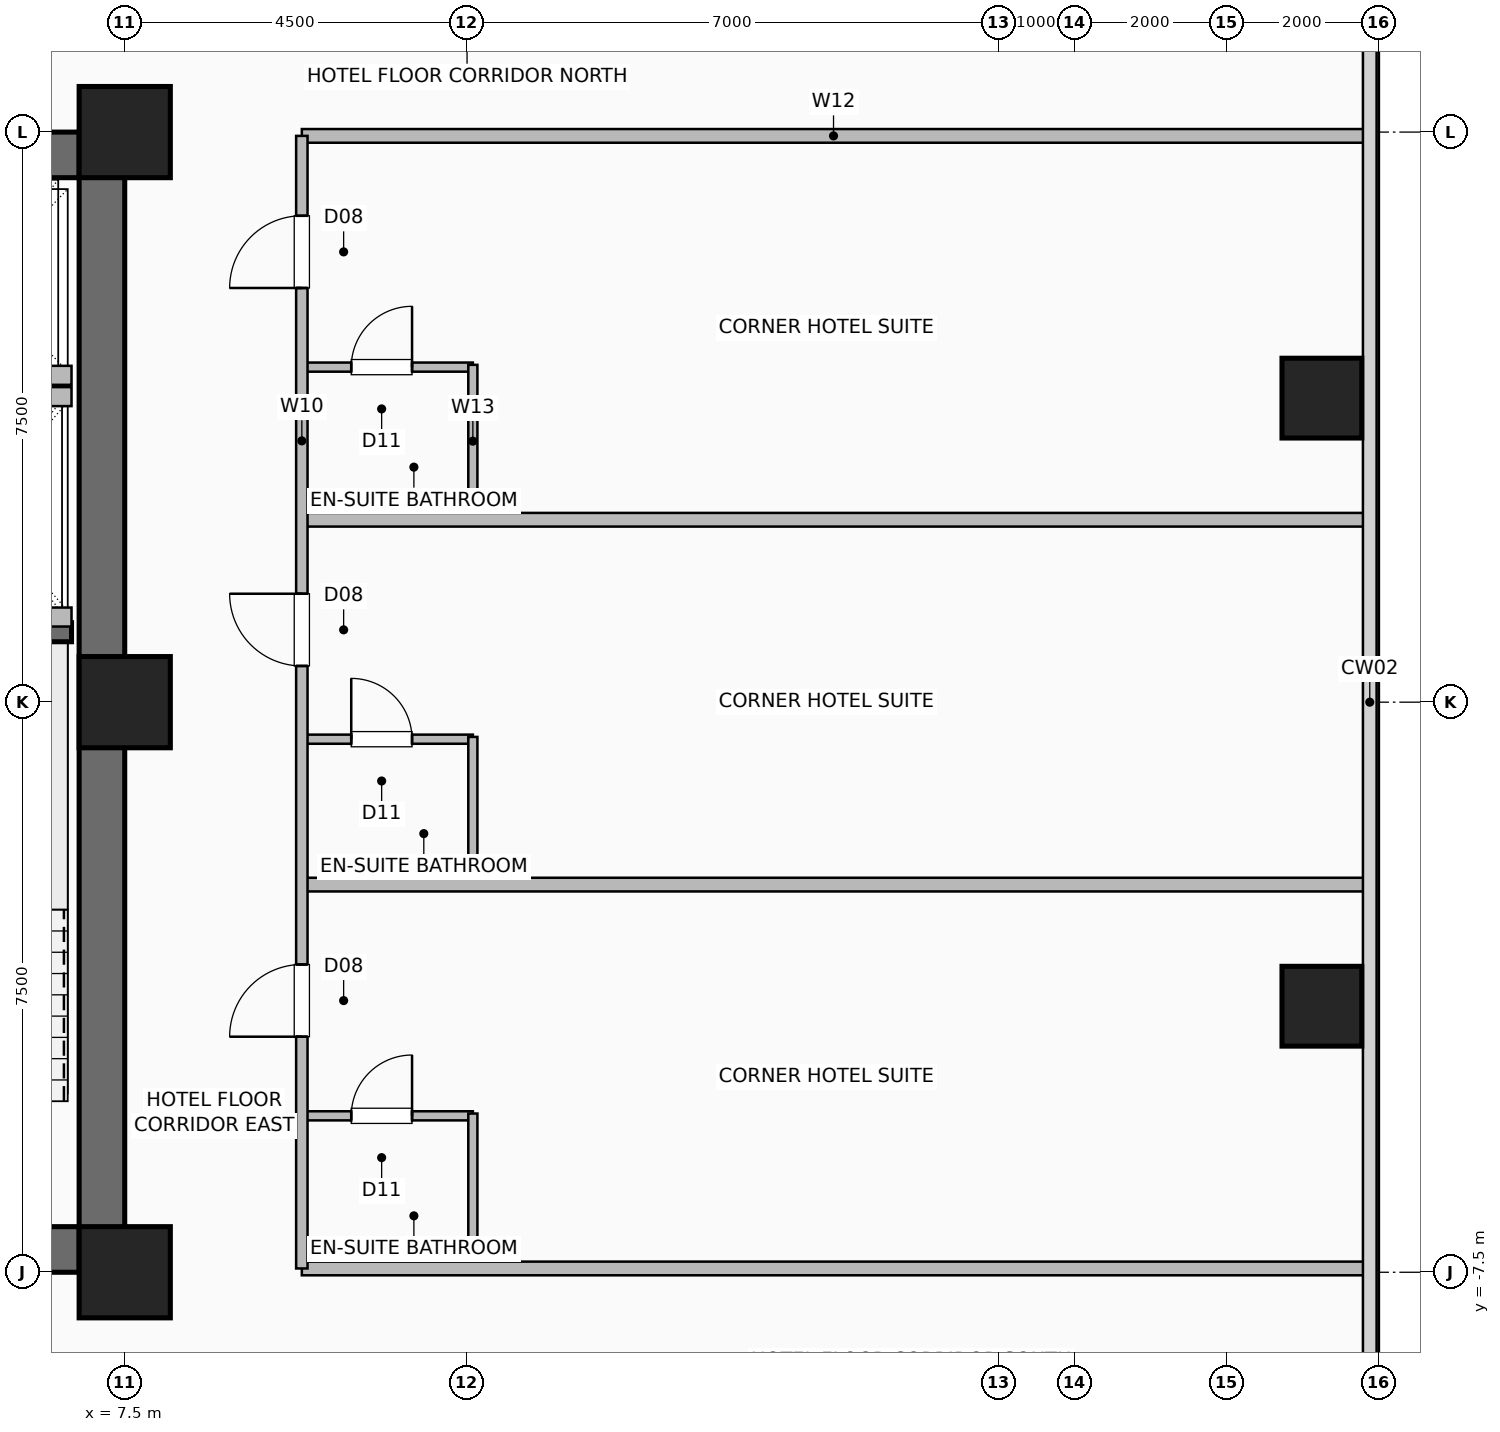
"""IFC4 building model, lengths in metres.
Left out: names, types, materials, properties, quantities, classifications, styles, units other than length and angle.
Written with IfcOpenShell. Run it as: python <this file> out.ifc"""

import sys

from ifc_helpers import new_model, si_unit, direction, frame, frame_2d, origin, origin_2d, place, context, subcontext, project, spatial, rectangle, hollow_rectangle, extrude, element, fill, save


model = new_model("IFC4")
c1 = context("Model", 3, precision=1e-05, world=origin(), true_north=direction((0.0, 1.0)))
c2 = subcontext(c1, "Body", "Model", "MODEL_VIEW")
j1 = project(units=[si_unit("LENGTHUNIT", "METRE"), si_unit("PLANEANGLEUNIT", "RADIAN")], contexts=[c1])
p1 = place(None, origin())
s1 = spatial("IfcSite", under=j1, at=p1, CompositionType="ELEMENT")
p2 = place(p1, origin())
s2 = spatial("IfcBuilding", under=s1, at=p2, CompositionType="ELEMENT")
p3 = place(p2, frame((0.0, 0.0, 51.5)))
s3 = spatial("IfcBuildingStorey", under=s2, at=p3, CompositionType="ELEMENT", Elevation=51.5)
for number, where, z_axis, x_axis in (
    (1, (7.5, -7.5, 0.0), (0.0, 0.0, 1.0), (1.0, 0.0, 0.0)),
    (2, (7.5, 0.0, 0.0), (0.0, 0.0, 1.0), (1.0, 0.0, 0.0)),
    (3, (7.5, 7.5, 0.0), (0.0, 0.0, 1.0), (1.0, 0.0, 0.0)),
):
    element("IfcColumn", number, at=place(p3, frame(where, z_axis=z_axis, x_axis=x_axis)), inside=s3, PredefinedType="COLUMN", context=c2, shape_type="SweptSolid", body=[
        extrude(hollow_rectangle(XDim=1.2, YDim=1.2, WallThickness=0.055, at=origin_2d()), origin(), (0.0, 0.0, 1.0), 3.5),
    ])
for number, where, z_axis, x_axis in (
    (4, (23.25, -4.0, 0.0), (0.0, 0.0, 1.0), (1.0, 0.0, 0.0)),
    (5, (23.25, 4.0, 0.0), (0.0, 0.0, 1.0), (1.0, 0.0, 0.0)),
):
    element("IfcColumn", number, at=place(p3, frame(where, z_axis=z_axis, x_axis=x_axis)), inside=s3, PredefinedType="COLUMN", context=c2, shape_type="SweptSolid", body=[
        extrude(hollow_rectangle(XDim=1.05, YDim=1.05, WallThickness=0.05, at=origin_2d()), origin(), (0.0, 0.0, 1.0), 3.5),
    ])
p4 = place(p3, frame((-7.5, -7.2, 0.0), z_axis=(0.0, 0.0, 1.0), x_axis=(1.0, 0.0, 0.0)))
e6 = element("IfcWall", 6, at=p4, inside=s3, PredefinedType="SHEAR", context=c2, shape_type="SweptSolid", body=[
    extrude(rectangle(XDim=15.0, YDim=0.6, at=frame_2d((7.5, 0.0))), origin(), (0.0, 0.0, 1.0), 3.25),
])
p5 = place(p4, frame((1.55, 0.0, 0.0)))
e7 = element("IfcOpeningElement", 7, at=p5, cuts=e6, PredefinedType="OPENING", context=c2, shape_type="SweptSolid", body=[
    extrude(rectangle(XDim=1.05, YDim=2.08, at=frame_2d((0.525, 1.04))), frame((0.0, 0.31, 0.0), z_axis=(0.0, -1.0, 0.0), x_axis=(1.0, 0.0, 0.0)), (0.0, 0.0, 1.0), 0.62),
])
p6 = place(p4, frame((12.4, 0.0, 0.0)))
e8 = element("IfcOpeningElement", 8, at=p6, cuts=e6, PredefinedType="OPENING", context=c2, shape_type="SweptSolid", body=[
    extrude(rectangle(XDim=1.05, YDim=2.08, at=frame_2d((0.525, 1.04))), frame((0.0, 0.31, 0.0), z_axis=(0.0, -1.0, 0.0), x_axis=(1.0, 0.0, 0.0)), (0.0, 0.0, 1.0), 0.62),
])
p7 = place(p4, frame((4.64, 0.0, 0.0)))
e9 = element("IfcOpeningElement", 9, at=p7, cuts=e6, PredefinedType="OPENING", context=c2, shape_type="SweptSolid", body=[
    extrude(rectangle(XDim=1.1, YDim=2.2, at=frame_2d((0.55, 1.1))), frame((0.0, 0.31, 0.0), z_axis=(0.0, -1.0, 0.0), x_axis=(1.0, 0.0, 0.0)), (0.0, 0.0, 1.0), 0.62),
])
p8 = place(p4, frame((6.52, 0.0, 0.0)))
e10 = element("IfcOpeningElement", 10, at=p8, cuts=e6, PredefinedType="OPENING", context=c2, shape_type="SweptSolid", body=[
    extrude(rectangle(XDim=1.1, YDim=2.2, at=frame_2d((0.55, 1.1))), frame((0.0, 0.31, 0.0), z_axis=(0.0, -1.0, 0.0), x_axis=(1.0, 0.0, 0.0)), (0.0, 0.0, 1.0), 0.62),
])
p9 = place(p4, frame((8.4, 0.0, 0.0)))
e11 = element("IfcOpeningElement", 11, at=p9, cuts=e6, PredefinedType="OPENING", context=c2, shape_type="SweptSolid", body=[
    extrude(rectangle(XDim=1.1, YDim=2.2, at=frame_2d((0.55, 1.1))), frame((0.0, 0.31, 0.0), z_axis=(0.0, -1.0, 0.0), x_axis=(1.0, 0.0, 0.0)), (0.0, 0.0, 1.0), 0.62),
])
for number, where, z_axis, x_axis in (
    (12, (-7.5, 7.2, 0.0), (0.0, 0.0, 1.0), (1.0, 0.0, 0.0)),
    (13, (7.2, -7.5, 0.0), (0.0, 0.0, 1.0), (0.0, 1.0, 0.0)),
):
    element("IfcWall", number, at=place(p3, frame(where, z_axis=z_axis, x_axis=x_axis)), inside=s3, PredefinedType="SHEAR", context=c2, shape_type="SweptSolid", body=[
        extrude(rectangle(XDim=15.0, YDim=0.6, at=frame_2d((7.5, 0.0))), origin(), (0.0, 0.0, 1.0), 3.25),
    ])
p10 = place(p3, frame((3.47, 0.92, 0.0), z_axis=(0.0, 0.0, 1.0), x_axis=(1.0, 0.0, 0.0)))
e14 = element("IfcWall", 14, at=p10, inside=s3, PredefinedType="SHEAR", context=c2, shape_type="SweptSolid", body=[
    extrude(rectangle(XDim=3.33, YDim=0.25, at=frame_2d((1.665, 0.0))), origin(), (0.0, 0.0, 1.0), 3.25),
])
p11 = place(p3, frame((4.38, 4.3, 0.0), z_axis=(0.0, 0.0, 1.0), x_axis=(1.0, 0.0, 0.0)))
e15 = element("IfcWall", 15, at=p11, inside=s3, PredefinedType="SHEAR", context=c2, shape_type="SweptSolid", body=[
    extrude(rectangle(XDim=2.42, YDim=0.25, at=frame_2d((1.21, 0.0))), origin(), (0.0, 0.0, 1.0), 3.25),
])
for number, where, z_axis, x_axis in (
    (16, (4.28, 1.12, 0.0), (0.0, 0.0, 1.0), (1.0, 0.0, 0.0)),
    (17, (4.28, 4.02, 0.0), (0.0, 0.0, 1.0), (1.0, 0.0, 0.0)),
):
    element("IfcWall", number, at=place(p3, frame(where, z_axis=z_axis, x_axis=x_axis)), inside=s3, PredefinedType="SHEAR", context=c2, shape_type="SweptSolid", body=[
        extrude(rectangle(XDim=2.52, YDim=0.25, at=frame_2d((1.26, 0.0))), origin(), (0.0, 0.0, 1.0), 3.25),
    ])
p12 = place(p3, frame((9.83, -5.442, 0.0), z_axis=(0.0, 0.0, 1.0), x_axis=(1.0, 0.0, 0.0)))
e18 = element("IfcWall", 18, at=p12, inside=s3, PredefinedType="PLUMBINGWALL", context=c2, shape_type="SweptSolid", body=[
    extrude(rectangle(XDim=2.25, YDim=0.12, at=frame_2d((1.125, 0.0))), origin(), (0.0, 0.0, 1.0), 3.25),
])
p13 = place(p12, frame((0.65, 0.0, 0.0)))
e19 = element("IfcOpeningElement", 19, at=p13, cuts=e18, PredefinedType="OPENING", context=c2, shape_type="SweptSolid", body=[
    extrude(rectangle(XDim=0.8, YDim=2.05, at=frame_2d((0.4, 1.025))), frame((0.0, 0.07, 0.0), z_axis=(0.0, -1.0, 0.0), x_axis=(1.0, 0.0, 0.0)), (0.0, 0.0, 1.0), 0.14),
])
p14 = place(p3, frame((12.08, -7.42, 0.0), z_axis=(0.0, 0.0, 1.0), x_axis=(0.0, 1.0, 0.0)))
e20 = element("IfcWall", 20, at=p14, inside=s3, PredefinedType="PLUMBINGWALL", context=c2, shape_type="SweptSolid", body=[
    extrude(rectangle(XDim=2.008, YDim=0.12, at=frame_2d((1.004, 0.0))), origin(), (0.0, 0.0, 1.0), 3.25),
])
p15 = place(p3, frame((9.83, -0.487, 0.0), z_axis=(0.0, 0.0, 1.0), x_axis=(1.0, 0.0, 0.0)))
e21 = element("IfcWall", 21, at=p15, inside=s3, PredefinedType="PLUMBINGWALL", context=c2, shape_type="SweptSolid", body=[
    extrude(rectangle(XDim=2.25, YDim=0.12, at=frame_2d((1.125, 0.0))), origin(), (0.0, 0.0, 1.0), 3.25),
])
p16 = place(p15, frame((0.65, 0.0, 0.0)))
e22 = element("IfcOpeningElement", 22, at=p16, cuts=e21, PredefinedType="OPENING", context=c2, shape_type="SweptSolid", body=[
    extrude(rectangle(XDim=0.8, YDim=2.05, at=frame_2d((0.4, 1.025))), frame((0.0, 0.07, 0.0), z_axis=(0.0, -1.0, 0.0), x_axis=(1.0, 0.0, 0.0)), (0.0, 0.0, 1.0), 0.14),
])
p17 = place(p3, frame((12.08, -2.37, 0.0), z_axis=(0.0, 0.0, 1.0), x_axis=(0.0, 1.0, 0.0)))
e23 = element("IfcWall", 23, at=p17, inside=s3, PredefinedType="PLUMBINGWALL", context=c2, shape_type="SweptSolid", body=[
    extrude(rectangle(XDim=1.913, YDim=0.12, at=frame_2d((0.957, 0.0))), origin(), (0.0, 0.0, 1.0), 3.25),
])
p18 = place(p3, frame((9.83, 4.408, 0.0), z_axis=(0.0, 0.0, 1.0), x_axis=(1.0, 0.0, 0.0)))
e24 = element("IfcWall", 24, at=p18, inside=s3, PredefinedType="PLUMBINGWALL", context=c2, shape_type="SweptSolid", body=[
    extrude(rectangle(XDim=2.25, YDim=0.12, at=frame_2d((1.125, 0.0))), origin(), (0.0, 0.0, 1.0), 3.25),
])
p19 = place(p18, frame((0.65, 0.0, 0.0)))
e25 = element("IfcOpeningElement", 25, at=p19, cuts=e24, PredefinedType="OPENING", context=c2, shape_type="SweptSolid", body=[
    extrude(rectangle(XDim=0.8, YDim=2.05, at=frame_2d((0.4, 1.025))), frame((0.0, 0.07, 0.0), z_axis=(0.0, -1.0, 0.0), x_axis=(1.0, 0.0, 0.0)), (0.0, 0.0, 1.0), 0.14),
])
p20 = place(p3, frame((12.08, 2.43, 0.0), z_axis=(0.0, 0.0, 1.0), x_axis=(0.0, 1.0, 0.0)))
e26 = element("IfcWall", 26, at=p20, inside=s3, PredefinedType="PLUMBINGWALL", context=c2, shape_type="SweptSolid", body=[
    extrude(rectangle(XDim=2.008, YDim=0.12, at=frame_2d((1.004, 0.0))), origin(), (0.0, 0.0, 1.0), 3.25),
])
for number, where, z_axis, x_axis in (
    (27, (9.83, -7.45, 0.0), (0.0, 0.0, 1.0), (1.0, 0.0, 0.0)),
    (28, (9.83, -2.4, 0.0), (0.0, 0.0, 1.0), (1.0, 0.0, 0.0)),
    (29, (9.83, 2.4, 0.0), (0.0, 0.0, 1.0), (1.0, 0.0, 0.0)),
    (30, (9.83, 7.45, 0.0), (0.0, 0.0, 1.0), (1.0, 0.0, 0.0)),
):
    element("IfcWall", number, at=place(p3, frame(where, z_axis=z_axis, x_axis=x_axis)), inside=s3, PredefinedType="PARTITIONING", context=c2, shape_type="SweptSolid", body=[
        extrude(rectangle(XDim=13.99, YDim=0.18, at=frame_2d((6.995, 0.0))), origin(), (0.0, 0.0, 1.0), 3.25),
    ])
p21 = place(p3, frame((9.83, -7.45, 0.0), z_axis=(0.0, 0.0, 1.0), x_axis=(0.0, 1.0, 0.0)))
e31 = element("IfcWall", 31, at=p21, inside=s3, PredefinedType="PARTITIONING", context=c2, shape_type="SweptSolid", body=[
    extrude(rectangle(XDim=14.9, YDim=0.15, at=frame_2d((7.45, 0.0))), origin(), (0.0, 0.0, 1.0), 3.25),
])
p22 = place(p21, frame((3.049, 0.0, 0.0)))
e32 = element("IfcOpeningElement", 32, at=p22, cuts=e31, PredefinedType="OPENING", context=c2, shape_type="SweptSolid", body=[
    extrude(rectangle(XDim=0.95, YDim=2.08, at=frame_2d((0.475, 1.04))), frame((0.0, 0.085, 0.0), z_axis=(0.0, -1.0, 0.0), x_axis=(1.0, 0.0, 0.0)), (0.0, 0.0, 1.0), 0.17),
])
p23 = place(p21, frame((7.927, 0.0, 0.0)))
e33 = element("IfcOpeningElement", 33, at=p23, cuts=e31, PredefinedType="OPENING", context=c2, shape_type="SweptSolid", body=[
    extrude(rectangle(XDim=0.95, YDim=2.08, at=frame_2d((0.475, 1.04))), frame((0.0, 0.085, 0.0), z_axis=(0.0, -1.0, 0.0), x_axis=(1.0, 0.0, 0.0)), (0.0, 0.0, 1.0), 0.17),
])
p24 = place(p21, frame((12.899, 0.0, 0.0)))
e34 = element("IfcOpeningElement", 34, at=p24, cuts=e31, PredefinedType="OPENING", context=c2, shape_type="SweptSolid", body=[
    extrude(rectangle(XDim=0.95, YDim=2.08, at=frame_2d((0.475, 1.04))), frame((0.0, 0.085, 0.0), z_axis=(0.0, -1.0, 0.0), x_axis=(1.0, 0.0, 0.0)), (0.0, 0.0, 1.0), 0.17),
])
p25 = place(p13, origin())
e35 = element("IfcDoor", 35, at=p25, inside=s3, OperationType="SINGLE_SWING_RIGHT", PredefinedType="DOOR", context=c2, shape_type="SweptSolid", body=[
    extrude(rectangle(XDim=0.8, YDim=2.05, at=frame_2d((0.4, 1.025))), frame((0.0, 0.025, 0.0), z_axis=(0.0, -1.0, 0.0), x_axis=(1.0, 0.0, 0.0)), (0.0, 0.0, 1.0), 0.05),
])
fill(e19, e35)
p26 = place(p16, origin())
e36 = element("IfcDoor", 36, at=p26, inside=s3, OperationType="SINGLE_SWING_LEFT", PredefinedType="DOOR", context=c2, shape_type="SweptSolid", body=[
    extrude(rectangle(XDim=0.8, YDim=2.05, at=frame_2d((0.4, 1.025))), frame((0.0, 0.025, 0.0), z_axis=(0.0, -1.0, 0.0), x_axis=(1.0, 0.0, 0.0)), (0.0, 0.0, 1.0), 0.05),
])
fill(e22, e36)
p27 = place(p19, origin())
e37 = element("IfcDoor", 37, at=p27, inside=s3, OperationType="SINGLE_SWING_RIGHT", PredefinedType="DOOR", context=c2, shape_type="SweptSolid", body=[
    extrude(rectangle(XDim=0.8, YDim=2.05, at=frame_2d((0.4, 1.025))), frame((0.0, 0.025, 0.0), z_axis=(0.0, -1.0, 0.0), x_axis=(1.0, 0.0, 0.0)), (0.0, 0.0, 1.0), 0.05),
])
fill(e25, e37)
p28 = place(p22, origin())
e38 = element("IfcDoor", 38, at=p28, inside=s3, OperationType="SINGLE_SWING_LEFT", PredefinedType="DOOR", context=c2, shape_type="SweptSolid", body=[
    extrude(rectangle(XDim=0.95, YDim=2.08, at=frame_2d((0.475, 1.04))), frame((0.0, 0.025, 0.0), z_axis=(0.0, -1.0, 0.0), x_axis=(1.0, 0.0, 0.0)), (0.0, 0.0, 1.0), 0.05),
])
fill(e32, e38)
p29 = place(p23, origin())
e39 = element("IfcDoor", 39, at=p29, inside=s3, OperationType="SINGLE_SWING_RIGHT", PredefinedType="DOOR", context=c2, shape_type="SweptSolid", body=[
    extrude(rectangle(XDim=0.95, YDim=2.08, at=frame_2d((0.475, 1.04))), frame((0.0, 0.025, 0.0), z_axis=(0.0, -1.0, 0.0), x_axis=(1.0, 0.0, 0.0)), (0.0, 0.0, 1.0), 0.05),
])
fill(e33, e39)
p30 = place(p24, origin())
e40 = element("IfcDoor", 40, at=p30, inside=s3, OperationType="SINGLE_SWING_LEFT", PredefinedType="DOOR", context=c2, shape_type="SweptSolid", body=[
    extrude(rectangle(XDim=0.95, YDim=2.08, at=frame_2d((0.475, 1.04))), frame((0.0, 0.025, 0.0), z_axis=(0.0, -1.0, 0.0), x_axis=(1.0, 0.0, 0.0)), (0.0, 0.0, 1.0), 0.05),
])
fill(e34, e40)
save(model, sys.argv[1])
